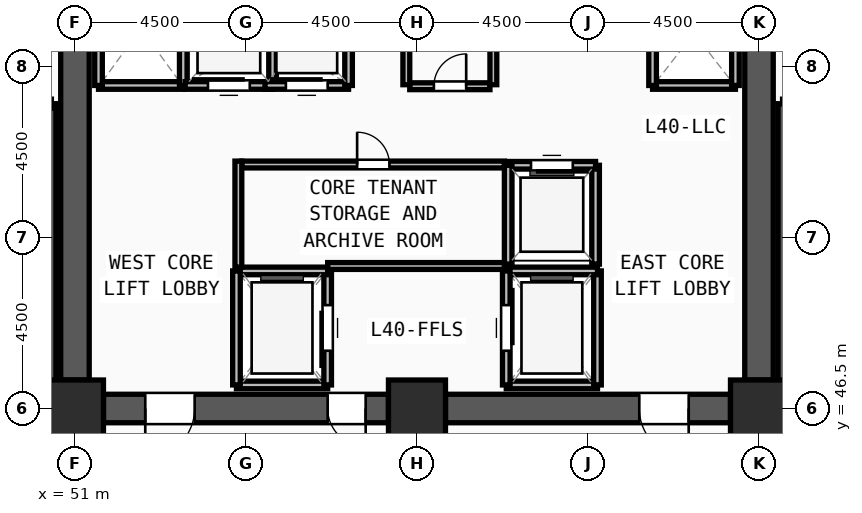
"""IFC4 building model, lengths in metres.
Left out: names, types, materials, properties, quantities, classifications, styles, units other than length and angle.
Written with IfcOpenShell. Run it as: python <this file> out.ifc"""

import sys

from ifc_helpers import new_model, si_unit, direction, frame, frame_2d, origin, origin_2d, place, context, subcontext, project, spatial, rectangle, extrude, source, transform, mapped, element, fill, save


model = new_model("IFC4")
c1 = context("Model", 3, precision=1e-05, world=origin(), true_north=direction((0.0, 1.0)))
c2 = subcontext(c1, "Body", "Model", "MODEL_VIEW")
j1 = project(units=[si_unit("LENGTHUNIT", "METRE"), si_unit("PLANEANGLEUNIT", "RADIAN")], contexts=[c1])
p1 = place(None, origin())
s1 = spatial("IfcSite", under=j1, at=p1, CompositionType="ELEMENT")
p2 = place(p1, origin())
s2 = spatial("IfcBuilding", under=s1, at=p2, CompositionType="ELEMENT")
p3 = place(p2, frame((0.0, 0.0, 155.25)))
s3 = spatial("IfcBuildingStorey", under=s2, at=p3, CompositionType="ELEMENT", Elevation=155.25)
m1 = source(origin(), c2, "Body", "SweptSolid", [
    extrude(rectangle(XDim=1.5, YDim=1.5, at=origin_2d()), origin(), (0.0, 0.0, 1.0), 3.75),
])
for number, where, z_axis, x_axis in (
    (1, (51.0, 46.5, 0.0), (0.0, 0.0, 1.0), (1.0, 0.0, 0.0)),
    (2, (60.0, 46.5, 0.0), (0.0, 0.0, 1.0), (1.0, 0.0, 0.0)),
    (3, (69.0, 46.5, 0.0), (0.0, 0.0, 1.0), (1.0, 0.0, 0.0)),
):
    element("IfcColumn", number, at=place(p3, frame(where, z_axis=z_axis, x_axis=x_axis)), inside=s3, PredefinedType="COLUMN", context=c2, shape_type="MappedRepresentation", body=[
        mapped(m1, transform((0.0, 0.0, 0.0), x_axis=(1.0, 0.0, 0.0), y_axis=(0.0, 1.0, 0.0), z_axis=(0.0, 0.0, 1.0), scale=1.0)),
    ])
p4 = place(p3, frame((69.0, 60.75, 0.0), z_axis=(0.0, 0.0, 1.0), x_axis=(0.0, -1.0, 0.0)))
e4 = element("IfcWall", 4, at=p4, inside=s3, PredefinedType="SHEAR", context=c2, shape_type="SweptSolid", body=[
    extrude(rectangle(XDim=13.5, YDim=0.75, at=frame_2d((6.75, 0.0))), origin(), (0.0, 0.0, 1.0), 3.57),
])
m2 = source(origin(), c2, "Body", "SweptSolid", [
    extrude(rectangle(XDim=1.2, YDim=2.2, at=frame_2d((0.6, 1.1))), frame((0.0, 0.385, 0.0), z_axis=(0.0, -1.0, 0.0), x_axis=(1.0, 0.0, 0.0)), (0.0, 0.0, 1.0), 0.77),
])
p5 = place(p4, frame((1.2, 0.0, 0.0)))
e5 = element("IfcOpeningElement", 5, at=p5, cuts=e4, PredefinedType="OPENING", context=c2, shape_type="MappedRepresentation", body=[
    mapped(m2, transform((0.0, 0.0, 0.0), x_axis=(1.0, 0.0, 0.0), y_axis=(0.0, 1.0, 0.0), z_axis=(0.0, 0.0, 1.0), scale=1.0)),
])
p6 = place(p3, frame((68.25, 46.5, 0.0), z_axis=(0.0, 0.0, 1.0), x_axis=(-1.0, 0.0, 0.0)))
e6 = element("IfcWall", 6, at=p6, inside=s3, PredefinedType="SHEAR", context=c2, shape_type="SweptSolid", body=[
    extrude(rectangle(XDim=7.5, YDim=0.75, at=frame_2d((3.75, 0.0))), origin(), (0.0, 0.0, 1.0), 3.57),
])
m3 = source(origin(), c2, "Body", "SweptSolid", [
    extrude(rectangle(XDim=1.3, YDim=2.2, at=frame_2d((0.65, 1.1))), frame((0.0, 0.385, 0.0), z_axis=(0.0, -1.0, 0.0), x_axis=(1.0, 0.0, 0.0)), (0.0, 0.0, 1.0), 0.77),
])
p7 = place(p6, frame((1.1, 0.0, 0.0)))
e7 = element("IfcOpeningElement", 7, at=p7, cuts=e6, PredefinedType="OPENING", context=c2, shape_type="MappedRepresentation", body=[
    mapped(m3, transform((0.0, 0.0, 0.0), x_axis=(1.0, 0.0, 0.0), y_axis=(0.0, 1.0, 0.0), z_axis=(0.0, 0.0, 1.0), scale=1.0)),
])
p8 = place(p3, frame((59.25, 46.5, 0.0), z_axis=(0.0, 0.0, 1.0), x_axis=(-1.0, 0.0, 0.0)))
e8 = element("IfcWall", 8, at=p8, inside=s3, PredefinedType="SHEAR", context=c2, shape_type="SweptSolid", body=[
    extrude(rectangle(XDim=7.5, YDim=0.75, at=frame_2d((3.75, 0.0))), origin(), (0.0, 0.0, 1.0), 3.57),
])
p9 = place(p8, frame((5.1, 0.0, 0.0)))
e9 = element("IfcOpeningElement", 9, at=p9, cuts=e8, PredefinedType="OPENING", context=c2, shape_type="MappedRepresentation", body=[
    mapped(m3, transform((0.0, 0.0, 0.0), x_axis=(1.0, 0.0, 0.0), y_axis=(0.0, 1.0, 0.0), z_axis=(0.0, 0.0, 1.0), scale=1.0)),
])
m4 = source(origin(), c2, "Body", "SweptSolid", [
    extrude(rectangle(XDim=1.0, YDim=2.2, at=frame_2d((0.5, 1.1))), frame((0.0, 0.385, 0.0), z_axis=(0.0, -1.0, 0.0), x_axis=(1.0, 0.0, 0.0)), (0.0, 0.0, 1.0), 0.77),
])
p10 = place(p8, frame((0.6, 0.0, 0.0)))
e10 = element("IfcOpeningElement", 10, at=p10, cuts=e8, PredefinedType="OPENING", context=c2, shape_type="MappedRepresentation", body=[
    mapped(m4, transform((0.0, 0.0, 0.0), x_axis=(1.0, 0.0, 0.0), y_axis=(0.0, 1.0, 0.0), z_axis=(0.0, 0.0, 1.0), scale=1.0)),
])
p11 = place(p3, frame((51.0, 47.25, 0.0), z_axis=(0.0, 0.0, 1.0), x_axis=(0.0, 1.0, 0.0)))
e11 = element("IfcWall", 11, at=p11, inside=s3, PredefinedType="SHEAR", context=c2, shape_type="SweptSolid", body=[
    extrude(rectangle(XDim=13.5, YDim=0.75, at=frame_2d((6.75, 0.0))), origin(), (0.0, 0.0, 1.0), 3.57),
])
for number, where, z_axis, x_axis in (
    (12, (50.38, 46.7, 0.0), (0.0, 0.0, 1.0), (0.0, 1.0, 0.0)),
    (13, (69.62, 54.52, 0.0), (0.0, 0.0, 1.0), (0.0, -1.0, 0.0)),
):
    element("IfcWall", number, at=place(p3, frame(where, z_axis=z_axis, x_axis=x_axis)), inside=s3, PredefinedType="SOLIDWALL", context=c2, shape_type="SweptSolid", body=[
        extrude(rectangle(XDim=7.82, YDim=0.24, at=frame_2d((3.91, 0.0))), origin(), (0.0, 0.0, 1.0), 3.57),
    ])
p12 = place(p3, frame((55.25, 47.12, 0.0), z_axis=(0.0, 0.0, 1.0), x_axis=(1.0, 0.0, 0.0)))
e14 = element("IfcWall", 14, at=p12, inside=s3, PredefinedType="SOLIDWALL", context=c2, shape_type="SweptSolid", body=[
    extrude(rectangle(XDim=2.4, YDim=0.2, at=frame_2d((1.2, 0.0))), origin(), (0.0, 0.0, 1.0), 3.57),
])
p13 = place(p3, frame((57.65, 47.12, 0.0), z_axis=(0.0, 0.0, 1.0), x_axis=(0.0, 1.0, 0.0)))
e15 = element("IfcWall", 15, at=p13, inside=s3, PredefinedType="SOLIDWALL", context=c2, shape_type="SweptSolid", body=[
    extrude(rectangle(XDim=3.0, YDim=0.2, at=frame_2d((1.5, 0.0))), origin(), (0.0, 0.0, 1.0), 3.57),
])
m5 = source(origin(), c2, "Body", "SweptSolid", [
    extrude(rectangle(XDim=1.2, YDim=2.3, at=frame_2d((0.6, 1.15))), frame((0.0, 0.11, 0.0), z_axis=(0.0, -1.0, 0.0), x_axis=(1.0, 0.0, 0.0)), (0.0, 0.0, 1.0), 0.22),
])
p14 = place(p13, frame((0.9, 0.0, 0.0)))
e16 = element("IfcOpeningElement", 16, at=p14, cuts=e15, PredefinedType="OPENING", context=c2, shape_type="MappedRepresentation", body=[
    mapped(m5, transform((0.0, 0.0, 0.0), x_axis=(1.0, 0.0, 0.0), y_axis=(0.0, 1.0, 0.0), z_axis=(0.0, 0.0, 1.0), scale=1.0)),
])
p15 = place(p3, frame((57.65, 50.12, 0.0), z_axis=(0.0, 0.0, 1.0), x_axis=(-1.0, 0.0, 0.0)))
e17 = element("IfcWall", 17, at=p15, inside=s3, PredefinedType="SOLIDWALL", context=c2, shape_type="SweptSolid", body=[
    extrude(rectangle(XDim=2.4, YDim=0.2, at=frame_2d((1.2, 0.0))), origin(), (0.0, 0.0, 1.0), 3.57),
])
p16 = place(p3, frame((55.25, 50.12, 0.0), z_axis=(0.0, 0.0, 1.0), x_axis=(0.0, -1.0, 0.0)))
e18 = element("IfcWall", 18, at=p16, inside=s3, PredefinedType="SOLIDWALL", context=c2, shape_type="SweptSolid", body=[
    extrude(rectangle(XDim=3.0, YDim=0.2, at=frame_2d((1.5, 0.0))), origin(), (0.0, 0.0, 1.0), 3.57),
])
p17 = place(p3, frame((62.35, 47.12, 0.0), z_axis=(0.0, 0.0, 1.0), x_axis=(1.0, 0.0, 0.0)))
e19 = element("IfcWall", 19, at=p17, inside=s3, PredefinedType="SOLIDWALL", context=c2, shape_type="SweptSolid", body=[
    extrude(rectangle(XDim=2.4, YDim=0.2, at=frame_2d((1.2, 0.0))), origin(), (0.0, 0.0, 1.0), 3.57),
])
p18 = place(p3, frame((64.75, 47.12, 0.0), z_axis=(0.0, 0.0, 1.0), x_axis=(0.0, 1.0, 0.0)))
e20 = element("IfcWall", 20, at=p18, inside=s3, PredefinedType="SOLIDWALL", context=c2, shape_type="SweptSolid", body=[
    extrude(rectangle(XDim=3.0, YDim=0.2, at=frame_2d((1.5, 0.0))), origin(), (0.0, 0.0, 1.0), 3.57),
])
p19 = place(p3, frame((64.75, 50.12, 0.0), z_axis=(0.0, 0.0, 1.0), x_axis=(-1.0, 0.0, 0.0)))
e21 = element("IfcWall", 21, at=p19, inside=s3, PredefinedType="SOLIDWALL", context=c2, shape_type="SweptSolid", body=[
    extrude(rectangle(XDim=2.4, YDim=0.2, at=frame_2d((1.2, 0.0))), origin(), (0.0, 0.0, 1.0), 3.57),
])
p20 = place(p3, frame((62.35, 50.12, 0.0), z_axis=(0.0, 0.0, 1.0), x_axis=(0.0, -1.0, 0.0)))
e22 = element("IfcWall", 22, at=p20, inside=s3, PredefinedType="SOLIDWALL", context=c2, shape_type="SweptSolid", body=[
    extrude(rectangle(XDim=3.0, YDim=0.2, at=frame_2d((1.5, 0.0))), origin(), (0.0, 0.0, 1.0), 3.57),
])
p21 = place(p20, frame((0.9, 0.0, 0.0)))
e23 = element("IfcOpeningElement", 23, at=p21, cuts=e22, PredefinedType="OPENING", context=c2, shape_type="MappedRepresentation", body=[
    mapped(m5, transform((0.0, 0.0, 0.0), x_axis=(1.0, 0.0, 0.0), y_axis=(0.0, 1.0, 0.0), z_axis=(0.0, 0.0, 1.0), scale=1.0)),
])
p22 = place(p3, frame((51.62, 55.0, 0.0), z_axis=(0.0, 0.0, 1.0), x_axis=(1.0, 0.0, 0.0)))
e24 = element("IfcWall", 24, at=p22, inside=s3, PredefinedType="SOLIDWALL", context=c2, shape_type="SweptSolid", body=[
    extrude(rectangle(XDim=2.23, YDim=0.2, at=frame_2d((1.115, 0.0))), origin(), (0.0, 0.0, 1.0), 3.57),
])
for number, where, z_axis, x_axis in (
    (25, (53.85, 55.0, 0.0), (0.0, 0.0, 1.0), (0.0, 1.0, 0.0)),
    (26, (51.62, 58.0, 0.0), (0.0, 0.0, 1.0), (0.0, -1.0, 0.0)),
):
    element("IfcWall", number, at=place(p3, frame(where, z_axis=z_axis, x_axis=x_axis)), inside=s3, PredefinedType="SOLIDWALL", context=c2, shape_type="SweptSolid", body=[
        extrude(rectangle(XDim=3.0, YDim=0.2, at=frame_2d((1.5, 0.0))), origin(), (0.0, 0.0, 1.0), 3.57),
    ])
p23 = place(p3, frame((66.2, 55.0, 0.0), z_axis=(0.0, 0.0, 1.0), x_axis=(1.0, 0.0, 0.0)))
e27 = element("IfcWall", 27, at=p23, inside=s3, PredefinedType="SOLIDWALL", context=c2, shape_type="SweptSolid", body=[
    extrude(rectangle(XDim=2.18, YDim=0.2, at=frame_2d((1.09, 0.0))), origin(), (0.0, 0.0, 1.0), 3.57),
])
for number, where, z_axis, x_axis in (
    (28, (68.38, 55.0, 0.0), (0.0, 0.0, 1.0), (0.0, 1.0, 0.0)),
    (29, (66.2, 57.75, 0.0), (0.0, 0.0, 1.0), (0.0, -1.0, 0.0)),
):
    element("IfcWall", number, at=place(p3, frame(where, z_axis=z_axis, x_axis=x_axis)), inside=s3, PredefinedType="SOLIDWALL", context=c2, shape_type="SweptSolid", body=[
        extrude(rectangle(XDim=2.75, YDim=0.2, at=frame_2d((1.375, 0.0))), origin(), (0.0, 0.0, 1.0), 3.57),
    ])
p24 = place(p3, frame((64.7, 50.3, 0.0), z_axis=(0.0, 0.0, 1.0), x_axis=(0.0, 1.0, 0.0)))
e30 = element("IfcWall", 30, at=p24, inside=s3, PredefinedType="SOLIDWALL", context=c2, shape_type="SweptSolid", body=[
    extrude(rectangle(XDim=2.6, YDim=0.2, at=frame_2d((1.3, 0.0))), origin(), (0.0, 0.0, 1.0), 3.57),
])
p25 = place(p3, frame((64.7, 52.9, 0.0), z_axis=(0.0, 0.0, 1.0), x_axis=(-1.0, 0.0, 0.0)))
e31 = element("IfcWall", 31, at=p25, inside=s3, PredefinedType="SOLIDWALL", context=c2, shape_type="SweptSolid", body=[
    extrude(rectangle(XDim=2.3, YDim=0.2, at=frame_2d((1.15, 0.0))), origin(), (0.0, 0.0, 1.0), 3.57),
])
m6 = source(origin(), c2, "Body", "SweptSolid", [
    extrude(rectangle(XDim=1.1, YDim=2.2, at=frame_2d((0.55, 1.1))), frame((0.0, 0.11, 0.0), z_axis=(0.0, -1.0, 0.0), x_axis=(1.0, 0.0, 0.0)), (0.0, 0.0, 1.0), 0.22),
])
p26 = place(p25, frame((0.6, 0.0, 0.0)))
e32 = element("IfcOpeningElement", 32, at=p26, cuts=e31, PredefinedType="OPENING", context=c2, shape_type="MappedRepresentation", body=[
    mapped(m6, transform((0.0, 0.0, 0.0), x_axis=(1.0, 0.0, 0.0), y_axis=(0.0, 1.0, 0.0), z_axis=(0.0, 0.0, 1.0), scale=1.0)),
])
p27 = place(p3, frame((62.4, 52.9, 0.0), z_axis=(0.0, 0.0, 1.0), x_axis=(0.0, -1.0, 0.0)))
e33 = element("IfcWall", 33, at=p27, inside=s3, PredefinedType="SOLIDWALL", context=c2, shape_type="SweptSolid", body=[
    extrude(rectangle(XDim=2.6, YDim=0.2, at=frame_2d((1.3, 0.0))), origin(), (0.0, 0.0, 1.0), 3.57),
])
p28 = place(p3, frame((53.9, 55.0, 0.0), z_axis=(0.0, 0.0, 1.0), x_axis=(1.0, 0.0, 0.0)))
e34 = element("IfcWall", 34, at=p28, inside=s3, PredefinedType="SOLIDWALL", context=c2, shape_type="SweptSolid", body=[
    extrude(rectangle(XDim=2.3, YDim=0.2, at=frame_2d((1.15, 0.0))), origin(), (0.0, 0.0, 1.0), 3.57),
])
p29 = place(p28, frame((0.6, 0.0, 0.0)))
e35 = element("IfcOpeningElement", 35, at=p29, cuts=e34, PredefinedType="OPENING", context=c2, shape_type="MappedRepresentation", body=[
    mapped(m6, transform((0.0, 0.0, 0.0), x_axis=(1.0, 0.0, 0.0), y_axis=(0.0, 1.0, 0.0), z_axis=(0.0, 0.0, 1.0), scale=1.0)),
])
p30 = place(p3, frame((56.2, 55.0, 0.0), z_axis=(0.0, 0.0, 1.0), x_axis=(0.0, 1.0, 0.0)))
e36 = element("IfcWall", 36, at=p30, inside=s3, PredefinedType="SOLIDWALL", context=c2, shape_type="SweptSolid", body=[
    extrude(rectangle(XDim=2.6, YDim=0.2, at=frame_2d((1.3, 0.0))), origin(), (0.0, 0.0, 1.0), 3.57),
])
p31 = place(p3, frame((56.0, 55.0, 0.0), z_axis=(0.0, 0.0, 1.0), x_axis=(1.0, 0.0, 0.0)))
e37 = element("IfcWall", 37, at=p31, inside=s3, PredefinedType="SOLIDWALL", context=c2, shape_type="SweptSolid", body=[
    extrude(rectangle(XDim=2.2, YDim=0.2, at=frame_2d((1.1, 0.0))), origin(), (0.0, 0.0, 1.0), 3.57),
])
p32 = place(p31, frame((0.55, 0.0, 0.0)))
e38 = element("IfcOpeningElement", 38, at=p32, cuts=e37, PredefinedType="OPENING", context=c2, shape_type="MappedRepresentation", body=[
    mapped(m6, transform((0.0, 0.0, 0.0), x_axis=(1.0, 0.0, 0.0), y_axis=(0.0, 1.0, 0.0), z_axis=(0.0, 0.0, 1.0), scale=1.0)),
])
p33 = place(p3, frame((58.2, 55.0, 0.0), z_axis=(0.0, 0.0, 1.0), x_axis=(0.0, 1.0, 0.0)))
e39 = element("IfcWall", 39, at=p33, inside=s3, PredefinedType="SOLIDWALL", context=c2, shape_type="SweptSolid", body=[
    extrude(rectangle(XDim=2.6, YDim=0.2, at=frame_2d((1.3, 0.0))), origin(), (0.0, 0.0, 1.0), 3.57),
])
p34 = place(p3, frame((55.39, 52.92, 0.0), z_axis=(0.0, 0.0, 1.0), x_axis=(1.0, 0.0, 0.0)))
e40 = element("IfcWall", 40, at=p34, inside=s3, PredefinedType="PARTITIONING", context=c2, shape_type="SweptSolid", body=[
    extrude(rectangle(XDim=6.91, YDim=0.18, at=frame_2d((3.455, 0.0))), origin(), (0.0, 0.0, 1.0), 3.57),
])
m7 = source(origin(), c2, "Body", "SweptSolid", [
    extrude(rectangle(XDim=0.85, YDim=2.1, at=frame_2d((0.425, 1.05))), frame((0.0, 0.1, 0.0), z_axis=(0.0, -1.0, 0.0), x_axis=(1.0, 0.0, 0.0)), (0.0, 0.0, 1.0), 0.2),
])
p35 = place(p34, frame((3.035, 0.0, 0.0)))
e41 = element("IfcOpeningElement", 41, at=p35, cuts=e40, PredefinedType="OPENING", context=c2, shape_type="MappedRepresentation", body=[
    mapped(m7, transform((0.0, 0.0, 0.0), x_axis=(1.0, 0.0, 0.0), y_axis=(0.0, 1.0, 0.0), z_axis=(0.0, 0.0, 1.0), scale=1.0)),
])
p36 = place(p3, frame((59.81, 54.98, 0.0), z_axis=(0.0, 0.0, 1.0), x_axis=(1.0, 0.0, 0.0)))
e42 = element("IfcWall", 42, at=p36, inside=s3, PredefinedType="PARTITIONING", context=c2, shape_type="SweptSolid", body=[
    extrude(rectangle(XDim=2.11, YDim=0.18, at=frame_2d((1.055, 0.0))), origin(), (0.0, 0.0, 1.0), 3.57),
])
p37 = place(p36, frame((0.635, 0.0, 0.0)))
e43 = element("IfcOpeningElement", 43, at=p37, cuts=e42, PredefinedType="OPENING", context=c2, shape_type="MappedRepresentation", body=[
    mapped(m7, transform((0.0, 0.0, 0.0), x_axis=(1.0, 0.0, 0.0), y_axis=(0.0, 1.0, 0.0), z_axis=(0.0, 0.0, 1.0), scale=1.0)),
])
for number, where, z_axis, x_axis in (
    (44, (59.72, 55.02, 0.0), (0.0, 0.0, 1.0), (0.0, 1.0, 0.0)),
    (45, (62.01, 55.02, 0.0), (0.0, 0.0, 1.0), (0.0, 1.0, 0.0)),
):
    element("IfcWall", number, at=place(p3, frame(where, z_axis=z_axis, x_axis=x_axis)), inside=s3, PredefinedType="PARTITIONING", context=c2, shape_type="SweptSolid", body=[
        extrude(rectangle(XDim=2.88, YDim=0.18, at=frame_2d((1.44, 0.0))), origin(), (0.0, 0.0, 1.0), 3.57),
    ])
p38 = place(p3, frame((55.3, 50.22, 0.0), z_axis=(0.0, 0.0, 1.0), x_axis=(0.0, 1.0, 0.0)))
e46 = element("IfcWall", 46, at=p38, inside=s3, PredefinedType="PARTITIONING", context=c2, shape_type="SweptSolid", body=[
    extrude(rectangle(XDim=2.79, YDim=0.18, at=frame_2d((1.395, 0.0))), origin(), (0.0, 0.0, 1.0), 3.57),
])
p39 = place(p3, frame((57.65, 50.25, 0.0), z_axis=(0.0, 0.0, 1.0), x_axis=(1.0, 0.0, 0.0)))
e47 = element("IfcWall", 47, at=p39, inside=s3, PredefinedType="PARTITIONING", context=c2, shape_type="SweptSolid", body=[
    extrude(rectangle(XDim=4.65, YDim=0.18, at=frame_2d((2.325, 0.0))), origin(), (0.0, 0.0, 1.0), 3.57),
])
m8 = source(origin(), c2, "Body", "SweptSolid", [
    extrude(rectangle(XDim=1.3, YDim=2.2, at=frame_2d((0.65, 1.1))), frame((0.0, 0.025, 0.0), z_axis=(0.0, -1.0, 0.0), x_axis=(1.0, 0.0, 0.0)), (0.0, 0.0, 1.0), 0.05),
])
p40 = place(p9, origin())
e48 = element("IfcDoor", 48, at=p40, inside=s3, OperationType="SINGLE_SWING_RIGHT", PredefinedType="DOOR", context=c2, shape_type="MappedRepresentation", body=[
    mapped(m8, transform((0.0, 0.0, 0.0), x_axis=(1.0, 0.0, 0.0), y_axis=(0.0, 1.0, 0.0), z_axis=(0.0, 0.0, 1.0), scale=1.0)),
])
fill(e9, e48)
m9 = source(origin(), c2, "Body", "SweptSolid", [
    extrude(rectangle(XDim=1.0, YDim=2.2, at=frame_2d((0.5, 1.1))), frame((0.0, 0.025, 0.0), z_axis=(0.0, -1.0, 0.0), x_axis=(1.0, 0.0, 0.0)), (0.0, 0.0, 1.0), 0.05),
])
p41 = place(p10, origin())
e49 = element("IfcDoor", 49, at=p41, inside=s3, OperationType="SINGLE_SWING_LEFT", PredefinedType="DOOR", context=c2, shape_type="MappedRepresentation", body=[
    mapped(m9, transform((0.0, 0.0, 0.0), x_axis=(1.0, 0.0, 0.0), y_axis=(0.0, 1.0, 0.0), z_axis=(0.0, 0.0, 1.0), scale=1.0)),
])
fill(e10, e49)
p42 = place(p7, origin())
e50 = element("IfcDoor", 50, at=p42, inside=s3, OperationType="SINGLE_SWING_LEFT", PredefinedType="DOOR", context=c2, shape_type="MappedRepresentation", body=[
    mapped(m8, transform((0.0, 0.0, 0.0), x_axis=(1.0, 0.0, 0.0), y_axis=(0.0, 1.0, 0.0), z_axis=(0.0, 0.0, 1.0), scale=1.0)),
])
fill(e7, e50)
m10 = source(origin(), c2, "Body", "SweptSolid", [
    extrude(rectangle(XDim=1.2, YDim=2.3, at=frame_2d((0.6, 1.15))), frame((0.0, 0.025, 0.0), z_axis=(0.0, -1.0, 0.0), x_axis=(1.0, 0.0, 0.0)), (0.0, 0.0, 1.0), 0.05),
])
p43 = place(p14, origin())
e51 = element("IfcDoor", 51, at=p43, inside=s3, OperationType="SLIDING_TO_LEFT", PredefinedType="DOOR", context=c2, shape_type="MappedRepresentation", body=[
    mapped(m10, transform((0.0, 0.0, 0.0), x_axis=(1.0, 0.0, 0.0), y_axis=(0.0, 1.0, 0.0), z_axis=(0.0, 0.0, 1.0), scale=1.0)),
])
fill(e16, e51)
p44 = place(p21, origin())
e52 = element("IfcDoor", 52, at=p44, inside=s3, OperationType="SLIDING_TO_LEFT", PredefinedType="DOOR", context=c2, shape_type="MappedRepresentation", body=[
    mapped(m10, transform((0.0, 0.0, 0.0), x_axis=(1.0, 0.0, 0.0), y_axis=(0.0, 1.0, 0.0), z_axis=(0.0, 0.0, 1.0), scale=1.0)),
])
fill(e23, e52)
m11 = source(origin(), c2, "Body", "SweptSolid", [
    extrude(rectangle(XDim=1.1, YDim=2.2, at=frame_2d((0.55, 1.1))), frame((0.0, 0.025, 0.0), z_axis=(0.0, -1.0, 0.0), x_axis=(1.0, 0.0, 0.0)), (0.0, 0.0, 1.0), 0.05),
])
p45 = place(p26, origin())
e53 = element("IfcDoor", 53, at=p45, inside=s3, OperationType="SLIDING_TO_LEFT", PredefinedType="DOOR", context=c2, shape_type="MappedRepresentation", body=[
    mapped(m11, transform((0.0, 0.0, 0.0), x_axis=(1.0, 0.0, 0.0), y_axis=(0.0, 1.0, 0.0), z_axis=(0.0, 0.0, 1.0), scale=1.0)),
])
fill(e32, e53)
p46 = place(p29, origin())
e54 = element("IfcDoor", 54, at=p46, inside=s3, OperationType="SLIDING_TO_LEFT", PredefinedType="DOOR", context=c2, shape_type="MappedRepresentation", body=[
    mapped(m11, transform((0.0, 0.0, 0.0), x_axis=(1.0, 0.0, 0.0), y_axis=(0.0, 1.0, 0.0), z_axis=(0.0, 0.0, 1.0), scale=1.0)),
])
fill(e35, e54)
p47 = place(p32, origin())
e55 = element("IfcDoor", 55, at=p47, inside=s3, OperationType="SLIDING_TO_LEFT", PredefinedType="DOOR", context=c2, shape_type="MappedRepresentation", body=[
    mapped(m11, transform((0.0, 0.0, 0.0), x_axis=(1.0, 0.0, 0.0), y_axis=(0.0, 1.0, 0.0), z_axis=(0.0, 0.0, 1.0), scale=1.0)),
])
fill(e38, e55)
m12 = source(origin(), c2, "Body", "SweptSolid", [
    extrude(rectangle(XDim=0.85, YDim=2.1, at=frame_2d((0.425, 1.05))), frame((0.0, 0.025, 0.0), z_axis=(0.0, -1.0, 0.0), x_axis=(1.0, 0.0, 0.0)), (0.0, 0.0, 1.0), 0.05),
])
p48 = place(p35, origin())
e56 = element("IfcDoor", 56, at=p48, inside=s3, OperationType="SINGLE_SWING_LEFT", PredefinedType="DOOR", context=c2, shape_type="MappedRepresentation", body=[
    mapped(m12, transform((0.0, 0.0, 0.0), x_axis=(1.0, 0.0, 0.0), y_axis=(0.0, 1.0, 0.0), z_axis=(0.0, 0.0, 1.0), scale=1.0)),
])
fill(e41, e56)
p49 = place(p37, origin())
e57 = element("IfcDoor", 57, at=p49, inside=s3, OperationType="SINGLE_SWING_RIGHT", PredefinedType="DOOR", context=c2, shape_type="MappedRepresentation", body=[
    mapped(m12, transform((0.0, 0.0, 0.0), x_axis=(1.0, 0.0, 0.0), y_axis=(0.0, 1.0, 0.0), z_axis=(0.0, 0.0, 1.0), scale=1.0)),
])
fill(e43, e57)
save(model, sys.argv[1])
